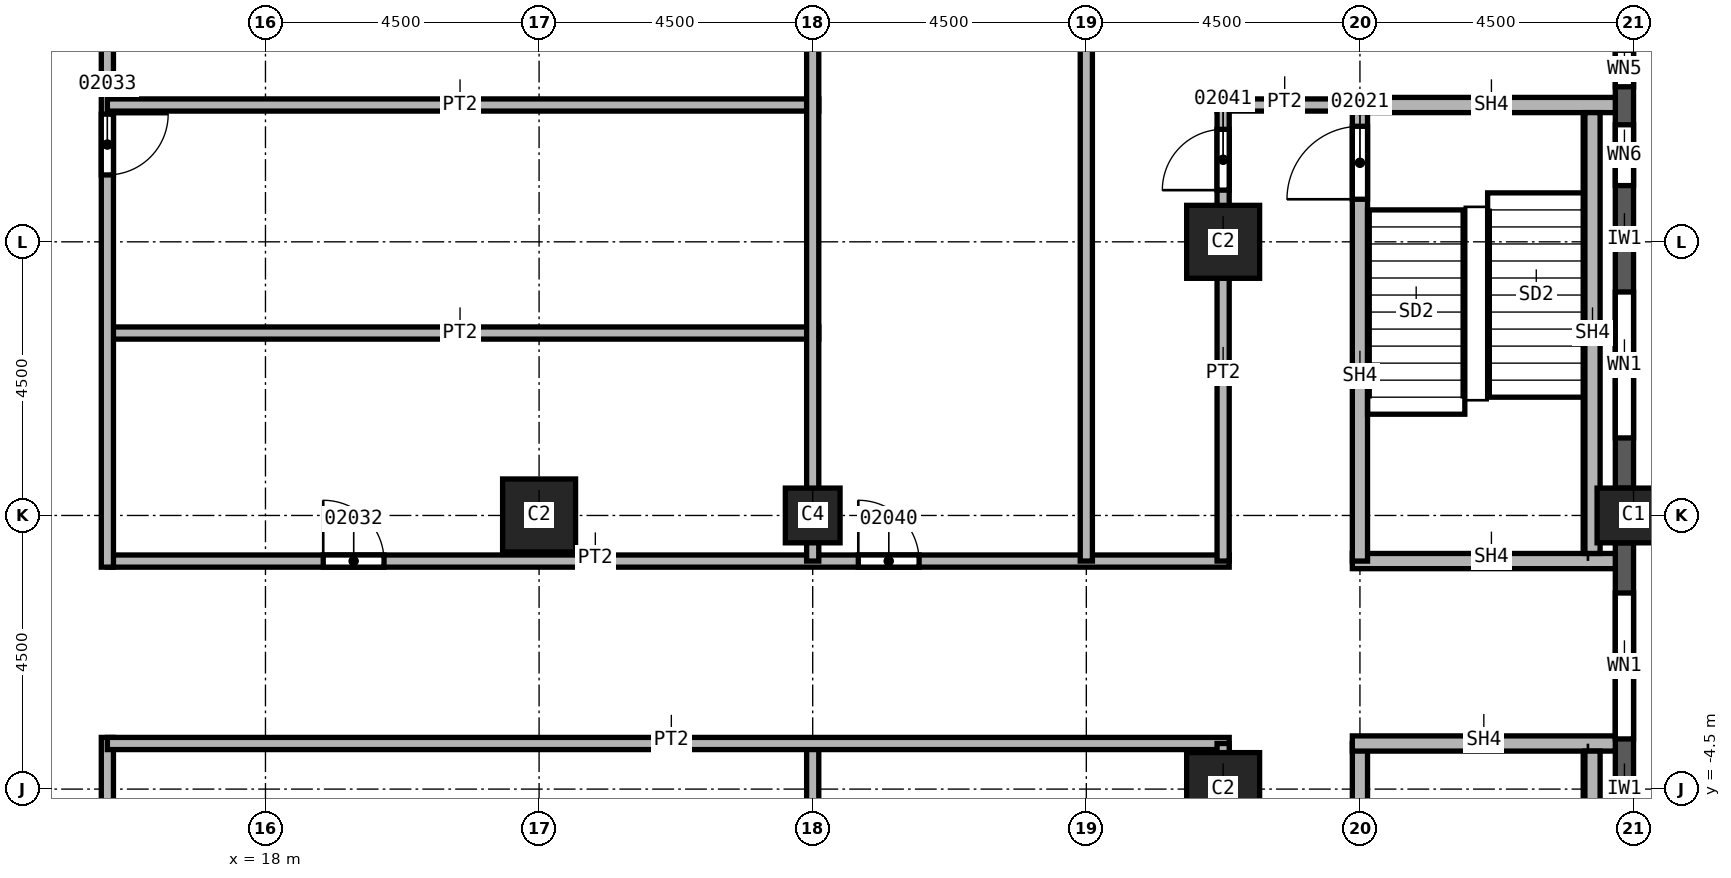
"""IFC4 building model, lengths in metres.
Left out: names, types, materials, properties, quantities, classifications, styles, units other than length and angle.
Written with IfcOpenShell. Run it as: python <this file> out.ifc"""

import sys

from ifc_helpers import new_model, si_unit, direction, frame, frame_2d, origin, origin_2d, place, context, subcontext, project, spatial, rectangle, extrude, element, fill, save


model = new_model("IFC4")
c1 = context("Model", 3, precision=1e-05, world=origin(), true_north=direction((0.0, 1.0)))
c2 = subcontext(c1, "Body", "Model", "MODEL_VIEW")
j1 = project(units=[si_unit("LENGTHUNIT", "METRE"), si_unit("PLANEANGLEUNIT", "RADIAN")], contexts=[c1])
p1 = place(None, origin())
s1 = spatial("IfcSite", under=j1, at=p1, CompositionType="ELEMENT")
p2 = place(p1, origin())
s2 = spatial("IfcBuilding", under=s1, at=p2, CompositionType="ELEMENT")
p3 = place(p2, frame((0.0, 0.0, 80.0)))
s3 = spatial("IfcBuildingStorey", under=s2, at=p3, CompositionType="ELEMENT", Elevation=80.0)
p4 = place(p3, frame((40.5, 0.0, 0.0), z_axis=(0.0, 0.0, 1.0), x_axis=(0.0, 1.0, 0.0)))
e1 = element("IfcColumn", 1, at=p4, inside=s3, PredefinedType="COLUMN", context=c2, shape_type="SweptSolid", body=[
    extrude(rectangle(XDim=0.9, YDim=1.2, at=origin_2d()), origin(), (0.0, 0.0, 1.0), 3.7),
])
for number, where, z_axis, x_axis in (
    (2, (33.75, 4.5, 0.0), (0.0, 0.0, 1.0), (1.0, 0.0, 0.0)),
    (3, (33.75, -4.5, 0.0), (0.0, 0.0, 1.0), (1.0, 0.0, 0.0)),
    (4, (22.5, 0.0, 0.0), (0.0, 0.0, 1.0), (1.0, 0.0, 0.0)),
):
    element("IfcColumn", number, at=place(p3, frame(where, z_axis=z_axis, x_axis=x_axis)), inside=s3, PredefinedType="COLUMN", context=c2, shape_type="SweptSolid", body=[
        extrude(rectangle(XDim=1.2, YDim=1.2, at=origin_2d()), origin(), (0.0, 0.0, 1.0), 3.7),
    ])
p5 = place(p3, frame((27.0, 0.0, 0.0), z_axis=(0.0, 0.0, 1.0), x_axis=(1.0, 0.0, 0.0)))
e5 = element("IfcColumn", 5, at=p5, inside=s3, PredefinedType="COLUMN", context=c2, shape_type="SweptSolid", body=[
    extrude(rectangle(XDim=0.9, YDim=0.9, at=origin_2d()), origin(), (0.0, 0.0, 1.0), 3.7),
])
p6 = place(p3, frame((40.35, -8.55, 0.0), z_axis=(0.0, 0.0, 1.0), x_axis=(0.0, 1.0, 0.0)))
e6 = element("IfcWall", 6, at=p6, inside=s3, PredefinedType="SOLIDWALL", context=c2, shape_type="SweptSolid", body=[
    extrude(rectangle(XDim=8.1, YDim=0.3, at=frame_2d((4.05, 0.0))), origin(), (0.0, 0.0, 1.0), 3.1),
])
p7 = place(p6, frame((0.825, 0.0, 0.8)))
e7 = element("IfcOpeningElement", 7, at=p7, cuts=e6, PredefinedType="OPENING", context=c2, shape_type="SweptSolid", body=[
    extrude(rectangle(XDim=2.4, YDim=1.95, at=frame_2d((1.2, 0.975))), frame((0.0, 0.15, 0.0), z_axis=(0.0, -1.0, 0.0), x_axis=(1.0, 0.0, 0.0)), (0.0, 0.0, 1.0), 0.3),
])
p8 = place(p6, frame((4.875, 0.0, 0.8)))
e8 = element("IfcOpeningElement", 8, at=p8, cuts=e6, PredefinedType="OPENING", context=c2, shape_type="SweptSolid", body=[
    extrude(rectangle(XDim=2.4, YDim=1.95, at=frame_2d((1.2, 0.975))), frame((0.0, 0.15, 0.0), z_axis=(0.0, -1.0, 0.0), x_axis=(1.0, 0.0, 0.0)), (0.0, 0.0, 1.0), 0.3),
])
p9 = place(p3, frame((40.35, 0.45, 0.0), z_axis=(0.0, 0.0, 1.0), x_axis=(0.0, 1.0, 0.0)))
e9 = element("IfcWall", 9, at=p9, inside=s3, PredefinedType="SOLIDWALL", context=c2, shape_type="SweptSolid", body=[
    extrude(rectangle(XDim=8.1, YDim=0.3, at=frame_2d((4.05, 0.0))), origin(), (0.0, 0.0, 1.0), 3.1),
])
p10 = place(p9, frame((0.825, 0.0, 0.8)))
e10 = element("IfcOpeningElement", 10, at=p10, cuts=e9, PredefinedType="OPENING", context=c2, shape_type="SweptSolid", body=[
    extrude(rectangle(XDim=2.4, YDim=1.95, at=frame_2d((1.2, 0.975))), frame((0.0, 0.15, 0.0), z_axis=(0.0, -1.0, 0.0), x_axis=(1.0, 0.0, 0.0)), (0.0, 0.0, 1.0), 0.3),
])
p11 = place(p9, frame((4.975, 0.0, 0.8)))
e11 = element("IfcOpeningElement", 11, at=p11, cuts=e9, PredefinedType="OPENING", context=c2, shape_type="SweptSolid", body=[
    extrude(rectangle(XDim=1.0, YDim=1.95, at=frame_2d((0.5, 0.975))), frame((0.0, 0.15, 0.0), z_axis=(0.0, -1.0, 0.0), x_axis=(1.0, 0.0, 0.0)), (0.0, 0.0, 1.0), 0.3),
])
p12 = place(p9, frame((6.6, 0.0, 0.8)))
e12 = element("IfcOpeningElement", 12, at=p12, cuts=e9, PredefinedType="OPENING", context=c2, shape_type="SweptSolid", body=[
    extrude(rectangle(XDim=0.6, YDim=1.95, at=frame_2d((0.3, 0.975))), frame((0.0, 0.15, 0.0), z_axis=(0.0, -1.0, 0.0), x_axis=(1.0, 0.0, 0.0)), (0.0, 0.0, 1.0), 0.3),
])
p13 = place(p3, frame((15.4, -3.65, 0.0), z_axis=(0.0, 0.0, 1.0), x_axis=(0.0, -1.0, 0.0)))
e13 = element("IfcWall", 13, at=p13, inside=s3, PredefinedType="PARTITIONING", context=c2, shape_type="SweptSolid", body=[
    extrude(rectangle(XDim=20.85, YDim=0.2, at=frame_2d((10.425, 0.0))), origin(), (0.0, 0.0, 1.0), 3.7),
])
p14 = place(p13, frame((10.9, 0.0, 0.0)))
e14 = element("IfcOpeningElement", 14, at=p14, cuts=e13, PredefinedType="OPENING", context=c2, shape_type="SweptSolid", body=[
    extrude(rectangle(XDim=1.0, YDim=2.1, at=frame_2d((0.5, 1.05))), frame((0.0, 0.1, 0.0), z_axis=(0.0, -1.0, 0.0), x_axis=(1.0, 0.0, 0.0)), (0.0, 0.0, 1.0), 0.2),
])
p15 = place(p3, frame((15.4, -0.75, 0.0), z_axis=(0.0, 0.0, 1.0), x_axis=(1.0, 0.0, 0.0)))
e15 = element("IfcWall", 15, at=p15, inside=s3, PredefinedType="PARTITIONING", context=c2, shape_type="SweptSolid", body=[
    extrude(rectangle(XDim=18.45, YDim=0.2, at=frame_2d((9.225, 0.0))), origin(), (0.0, 0.0, 1.0), 3.7),
])
p16 = place(p15, frame((3.55, 0.0, 0.0)))
e16 = element("IfcOpeningElement", 16, at=p16, cuts=e15, PredefinedType="OPENING", context=c2, shape_type="SweptSolid", body=[
    extrude(rectangle(XDim=1.0, YDim=2.1, at=frame_2d((0.5, 1.05))), frame((0.0, 0.1, 0.0), z_axis=(0.0, -1.0, 0.0), x_axis=(1.0, 0.0, 0.0)), (0.0, 0.0, 1.0), 0.2),
])
p17 = place(p15, frame((12.35, 0.0, 0.0)))
e17 = element("IfcOpeningElement", 17, at=p17, cuts=e15, PredefinedType="OPENING", context=c2, shape_type="SweptSolid", body=[
    extrude(rectangle(XDim=1.0, YDim=2.1, at=frame_2d((0.5, 1.05))), frame((0.0, 0.1, 0.0), z_axis=(0.0, -1.0, 0.0), x_axis=(1.0, 0.0, 0.0)), (0.0, 0.0, 1.0), 0.2),
])
p18 = place(p3, frame((15.4, 3.0, 0.0), z_axis=(0.0, 0.0, 1.0), x_axis=(1.0, 0.0, 0.0)))
e18 = element("IfcWall", 18, at=p18, inside=s3, PredefinedType="PARTITIONING", context=c2, shape_type="SweptSolid", body=[
    extrude(rectangle(XDim=11.7, YDim=0.2, at=frame_2d((5.85, 0.0))), origin(), (0.0, 0.0, 1.0), 3.7),
])
p19 = place(p3, frame((15.4, 24.5, 0.0), z_axis=(0.0, 0.0, 1.0), x_axis=(0.0, -1.0, 0.0)))
e19 = element("IfcWall", 19, at=p19, inside=s3, PredefinedType="PARTITIONING", context=c2, shape_type="SweptSolid", body=[
    extrude(rectangle(XDim=25.35, YDim=0.2, at=frame_2d((12.675, 0.0))), origin(), (0.0, 0.0, 1.0), 3.7),
])
p20 = place(p19, frame((17.9, 0.0, 0.0)))
e20 = element("IfcOpeningElement", 20, at=p20, cuts=e19, PredefinedType="OPENING", context=c2, shape_type="SweptSolid", body=[
    extrude(rectangle(XDim=1.0, YDim=2.1, at=frame_2d((0.5, 1.05))), frame((0.0, 0.1, 0.0), z_axis=(0.0, -1.0, 0.0), x_axis=(1.0, 0.0, 0.0)), (0.0, 0.0, 1.0), 0.2),
])
p21 = place(p19, frame((14.3, 0.0, 0.0)))
e21 = element("IfcOpeningElement", 21, at=p21, cuts=e19, PredefinedType="OPENING", context=c2, shape_type="SweptSolid", body=[
    extrude(rectangle(XDim=1.0, YDim=2.1, at=frame_2d((0.5, 1.05))), frame((0.0, 0.1, 0.0), z_axis=(0.0, -1.0, 0.0), x_axis=(1.0, 0.0, 0.0)), (0.0, 0.0, 1.0), 0.2),
])
p22 = place(p19, frame((4.6, 0.0, 0.0)))
e22 = element("IfcOpeningElement", 22, at=p22, cuts=e19, PredefinedType="OPENING", context=c2, shape_type="SweptSolid", body=[
    extrude(rectangle(XDim=1.0, YDim=2.1, at=frame_2d((0.5, 1.05))), frame((0.0, 0.1, 0.0), z_axis=(0.0, -1.0, 0.0), x_axis=(1.0, 0.0, 0.0)), (0.0, 0.0, 1.0), 0.2),
])
p23 = place(p3, frame((15.4, 6.75, 0.0), z_axis=(0.0, 0.0, 1.0), x_axis=(1.0, 0.0, 0.0)))
e23 = element("IfcWall", 23, at=p23, inside=s3, PredefinedType="PARTITIONING", context=c2, shape_type="SweptSolid", body=[
    extrude(rectangle(XDim=11.7, YDim=0.2, at=frame_2d((5.85, 0.0))), origin(), (0.0, 0.0, 1.0), 3.7),
])
p24 = place(p3, frame((27.0, -3.75, 0.0), z_axis=(0.0, 0.0, 1.0), x_axis=(0.0, -1.0, 0.0)))
e24 = element("IfcWall", 24, at=p24, inside=s3, PredefinedType="PARTITIONING", context=c2, shape_type="SweptSolid", body=[
    extrude(rectangle(XDim=13.65, YDim=0.2, at=frame_2d((6.825, 0.0))), origin(), (0.0, 0.0, 1.0), 3.7),
])
p25 = place(p3, frame((27.0, 17.4, 0.0), z_axis=(0.0, 0.0, 1.0), x_axis=(0.0, -1.0, 0.0)))
e25 = element("IfcWall", 25, at=p25, inside=s3, PredefinedType="PARTITIONING", context=c2, shape_type="SweptSolid", body=[
    extrude(rectangle(XDim=18.15, YDim=0.2, at=frame_2d((9.075, 0.0))), origin(), (0.0, 0.0, 1.0), 3.7),
])
p26 = place(p3, frame((33.85, -3.75, 0.0), z_axis=(0.0, 0.0, 1.0), x_axis=(-1.0, 0.0, 0.0)))
e26 = element("IfcWall", 26, at=p26, inside=s3, PredefinedType="PARTITIONING", context=c2, shape_type="SweptSolid", body=[
    extrude(rectangle(XDim=18.45, YDim=0.2, at=frame_2d((9.225, 0.0))), origin(), (0.0, 0.0, 1.0), 3.7),
])
p27 = place(p3, frame((31.5, 17.4, 0.0), z_axis=(0.0, 0.0, 1.0), x_axis=(0.0, -1.0, 0.0)))
e27 = element("IfcWall", 27, at=p27, inside=s3, PredefinedType="PARTITIONING", context=c2, shape_type="SweptSolid", body=[
    extrude(rectangle(XDim=18.15, YDim=0.2, at=frame_2d((9.075, 0.0))), origin(), (0.0, 0.0, 1.0), 3.7),
])
p28 = place(p3, frame((33.65, 6.75, 0.0), z_axis=(0.0, 0.0, 1.0), x_axis=(1.0, 0.0, 0.0)))
e28 = element("IfcWall", 28, at=p28, inside=s3, PredefinedType="PARTITIONING", context=c2, shape_type="SweptSolid", body=[
    extrude(rectangle(XDim=2.35, YDim=0.2, at=frame_2d((1.175, 0.0))), origin(), (0.0, 0.0, 1.0), 3.7),
])
p29 = place(p3, frame((33.75, -11.25, 0.0), z_axis=(0.0, 0.0, 1.0), x_axis=(0.0, 1.0, 0.0)))
e29 = element("IfcWall", 29, at=p29, inside=s3, PredefinedType="PARTITIONING", context=c2, shape_type="SweptSolid", body=[
    extrude(rectangle(XDim=7.5, YDim=0.2, at=frame_2d((3.75, 0.0))), origin(), (0.0, 0.0, 1.0), 3.7),
])
p30 = place(p29, frame((4.9, 0.0, 0.0)))
e30 = element("IfcOpeningElement", 30, at=p30, cuts=e29, PredefinedType="OPENING", context=c2, shape_type="SweptSolid", body=[
    extrude(rectangle(XDim=1.0, YDim=2.1, at=frame_2d((0.5, 1.05))), frame((0.0, 0.1, 0.0), z_axis=(0.0, -1.0, 0.0), x_axis=(1.0, 0.0, 0.0)), (0.0, 0.0, 1.0), 0.2),
])
p31 = place(p3, frame((33.75, -0.75, 0.0), z_axis=(0.0, 0.0, 1.0), x_axis=(0.0, 1.0, 0.0)))
e31 = element("IfcWall", 31, at=p31, inside=s3, PredefinedType="PARTITIONING", context=c2, shape_type="SweptSolid", body=[
    extrude(rectangle(XDim=7.5, YDim=0.2, at=frame_2d((3.75, 0.0))), origin(), (0.0, 0.0, 1.0), 3.7),
])
p32 = place(p31, frame((6.1, 0.0, 0.0)))
e32 = element("IfcOpeningElement", 32, at=p32, cuts=e31, PredefinedType="OPENING", context=c2, shape_type="SweptSolid", body=[
    extrude(rectangle(XDim=1.0, YDim=2.1, at=frame_2d((0.5, 1.05))), frame((0.0, 0.1, 0.0), z_axis=(0.0, -1.0, 0.0), x_axis=(1.0, 0.0, 0.0)), (0.0, 0.0, 1.0), 0.2),
])
p33 = place(p3, frame((35.875, -0.75, 0.0), z_axis=(0.0, 0.0, 1.0), x_axis=(1.0, 0.0, 0.0)))
e33 = element("IfcWall", 33, at=p33, inside=s3, PredefinedType="SOLIDWALL", context=c2, shape_type="SweptSolid", body=[
    extrude(rectangle(XDim=4.325, YDim=0.25, at=frame_2d((2.163, 0.0))), origin(), (0.0, 0.0, 1.0), 3.7),
])
p34 = place(p3, frame((36.0, -11.375, 0.0), z_axis=(0.0, 0.0, 1.0), x_axis=(0.0, 1.0, 0.0)))
e34 = element("IfcWall", 34, at=p34, inside=s3, PredefinedType="SOLIDWALL", context=c2, shape_type="SweptSolid", body=[
    extrude(rectangle(XDim=7.625, YDim=0.25, at=frame_2d((3.812, 0.0))), origin(), (0.0, 0.0, 1.0), 3.7),
])
p35 = place(p34, frame((0.4, 0.0, 0.0)))
e35 = element("IfcOpeningElement", 35, at=p35, cuts=e34, PredefinedType="OPENING", context=c2, shape_type="SweptSolid", body=[
    extrude(rectangle(XDim=1.2, YDim=2.1, at=frame_2d((0.6, 1.05))), frame((0.0, 0.125, 0.0), z_axis=(0.0, -1.0, 0.0), x_axis=(1.0, 0.0, 0.0)), (0.0, 0.0, 1.0), 0.25),
])
p36 = place(p3, frame((36.0, -0.75, 0.0), z_axis=(0.0, 0.0, 1.0), x_axis=(0.0, 1.0, 0.0)))
e36 = element("IfcWall", 36, at=p36, inside=s3, PredefinedType="SOLIDWALL", context=c2, shape_type="SweptSolid", body=[
    extrude(rectangle(XDim=7.625, YDim=0.25, at=frame_2d((3.812, 0.0))), origin(), (0.0, 0.0, 1.0), 3.7),
])
p37 = place(p36, frame((5.95, 0.0, 0.0)))
e37 = element("IfcOpeningElement", 37, at=p37, cuts=e36, PredefinedType="OPENING", context=c2, shape_type="SweptSolid", body=[
    extrude(rectangle(XDim=1.2, YDim=2.1, at=frame_2d((0.6, 1.05))), frame((0.0, 0.125, 0.0), z_axis=(0.0, -1.0, 0.0), x_axis=(1.0, 0.0, 0.0)), (0.0, 0.0, 1.0), 0.25),
])
p38 = place(p3, frame((36.0, 6.75, 0.0), z_axis=(0.0, 0.0, 1.0), x_axis=(1.0, 0.0, 0.0)))
e38 = element("IfcWall", 38, at=p38, inside=s3, PredefinedType="SOLIDWALL", context=c2, shape_type="SweptSolid", body=[
    extrude(rectangle(XDim=4.2, YDim=0.25, at=frame_2d((2.1, 0.0))), origin(), (0.0, 0.0, 1.0), 3.7),
])
p39 = place(p3, frame((40.2, -3.75, 0.0), z_axis=(0.0, 0.0, 1.0), x_axis=(-1.0, 0.0, 0.0)))
e39 = element("IfcWall", 39, at=p39, inside=s3, PredefinedType="SOLIDWALL", context=c2, shape_type="SweptSolid", body=[
    extrude(rectangle(XDim=4.325, YDim=0.25, at=frame_2d((2.163, 0.0))), origin(), (0.0, 0.0, 1.0), 3.7),
])
for number, where, z_axis, x_axis in (
    (40, (39.825, -11.125, 0.0), (0.0, 0.0, 1.0), (0.0, 1.0, 0.0)),
    (41, (39.825, -0.625, 0.0), (0.0, 0.0, 1.0), (0.0, 1.0, 0.0)),
):
    element("IfcWall", number, at=place(p3, frame(where, z_axis=z_axis, x_axis=x_axis)), inside=s3, PredefinedType="SOLIDWALL", context=c2, shape_type="SweptSolid", body=[
        extrude(rectangle(XDim=7.25, YDim=0.25, at=frame_2d((3.625, 0.0))), origin(), (0.0, 0.0, 1.0), 3.7),
    ])
p40 = place(p8, origin())
e42 = element("IfcWindow", 42, at=p40, inside=s3, PartitioningType="SINGLE_PANEL", PredefinedType="WINDOW", context=c2, shape_type="SweptSolid", body=[
    extrude(rectangle(XDim=2.4, YDim=1.95, at=frame_2d((1.2, 0.975))), frame((0.0, 0.03, 0.0), z_axis=(0.0, -1.0, 0.0), x_axis=(1.0, 0.0, 0.0)), (0.0, 0.0, 1.0), 0.06),
])
fill(e8, e42)
p41 = place(p10, origin())
e43 = element("IfcWindow", 43, at=p41, inside=s3, PartitioningType="SINGLE_PANEL", PredefinedType="WINDOW", context=c2, shape_type="SweptSolid", body=[
    extrude(rectangle(XDim=2.4, YDim=1.95, at=frame_2d((1.2, 0.975))), frame((0.0, 0.03, 0.0), z_axis=(0.0, -1.0, 0.0), x_axis=(1.0, 0.0, 0.0)), (0.0, 0.0, 1.0), 0.06),
])
fill(e10, e43)
p42 = place(p37, origin())
e44 = element("IfcDoor", 44, at=p42, inside=s3, OperationType="SINGLE_SWING_RIGHT", PredefinedType="DOOR", context=c2, shape_type="SweptSolid", body=[
    extrude(rectangle(XDim=1.2, YDim=2.1, at=frame_2d((0.6, 1.05))), frame((0.0, 0.025, 0.0), z_axis=(0.0, -1.0, 0.0), x_axis=(1.0, 0.0, 0.0)), (0.0, 0.0, 1.0), 0.05),
])
fill(e37, e44)
p43 = place(p16, origin())
e45 = element("IfcDoor", 45, at=p43, inside=s3, OperationType="SINGLE_SWING_LEFT", PredefinedType="DOOR", context=c2, shape_type="SweptSolid", body=[
    extrude(rectangle(XDim=1.0, YDim=2.1, at=frame_2d((0.5, 1.05))), frame((0.0, 0.025, 0.0), z_axis=(0.0, -1.0, 0.0), x_axis=(1.0, 0.0, 0.0)), (0.0, 0.0, 1.0), 0.05),
])
fill(e16, e45)
p44 = place(p20, origin())
e46 = element("IfcDoor", 46, at=p44, inside=s3, OperationType="SINGLE_SWING_RIGHT", PredefinedType="DOOR", context=c2, shape_type="SweptSolid", body=[
    extrude(rectangle(XDim=1.0, YDim=2.1, at=frame_2d((0.5, 1.05))), frame((0.0, 0.025, 0.0), z_axis=(0.0, -1.0, 0.0), x_axis=(1.0, 0.0, 0.0)), (0.0, 0.0, 1.0), 0.05),
])
fill(e20, e46)
p45 = place(p17, origin())
e47 = element("IfcDoor", 47, at=p45, inside=s3, OperationType="SINGLE_SWING_LEFT", PredefinedType="DOOR", context=c2, shape_type="SweptSolid", body=[
    extrude(rectangle(XDim=1.0, YDim=2.1, at=frame_2d((0.5, 1.05))), frame((0.0, 0.025, 0.0), z_axis=(0.0, -1.0, 0.0), x_axis=(1.0, 0.0, 0.0)), (0.0, 0.0, 1.0), 0.05),
])
fill(e17, e47)
p46 = place(p32, origin())
e48 = element("IfcDoor", 48, at=p46, inside=s3, OperationType="SINGLE_SWING_RIGHT", PredefinedType="DOOR", context=c2, shape_type="SweptSolid", body=[
    extrude(rectangle(XDim=1.0, YDim=2.1, at=frame_2d((0.5, 1.05))), frame((0.0, 0.025, 0.0), z_axis=(0.0, -1.0, 0.0), x_axis=(1.0, 0.0, 0.0)), (0.0, 0.0, 1.0), 0.05),
])
fill(e32, e48)
p47 = place(p11, origin())
e49 = element("IfcWindow", 49, at=p47, inside=s3, PartitioningType="SINGLE_PANEL", PredefinedType="WINDOW", context=c2, shape_type="SweptSolid", body=[
    extrude(rectangle(XDim=1.0, YDim=1.95, at=frame_2d((0.5, 0.975))), frame((0.0, 0.03, 0.0), z_axis=(0.0, -1.0, 0.0), x_axis=(1.0, 0.0, 0.0)), (0.0, 0.0, 1.0), 0.06),
])
fill(e11, e49)
p48 = place(p12, origin())
e50 = element("IfcWindow", 50, at=p48, inside=s3, PartitioningType="SINGLE_PANEL", PredefinedType="WINDOW", context=c2, shape_type="SweptSolid", body=[
    extrude(rectangle(XDim=0.6, YDim=1.95, at=frame_2d((0.3, 0.975))), frame((0.0, 0.03, 0.0), z_axis=(0.0, -1.0, 0.0), x_axis=(1.0, 0.0, 0.0)), (0.0, 0.0, 1.0), 0.06),
])
fill(e12, e50)
save(model, sys.argv[1])
